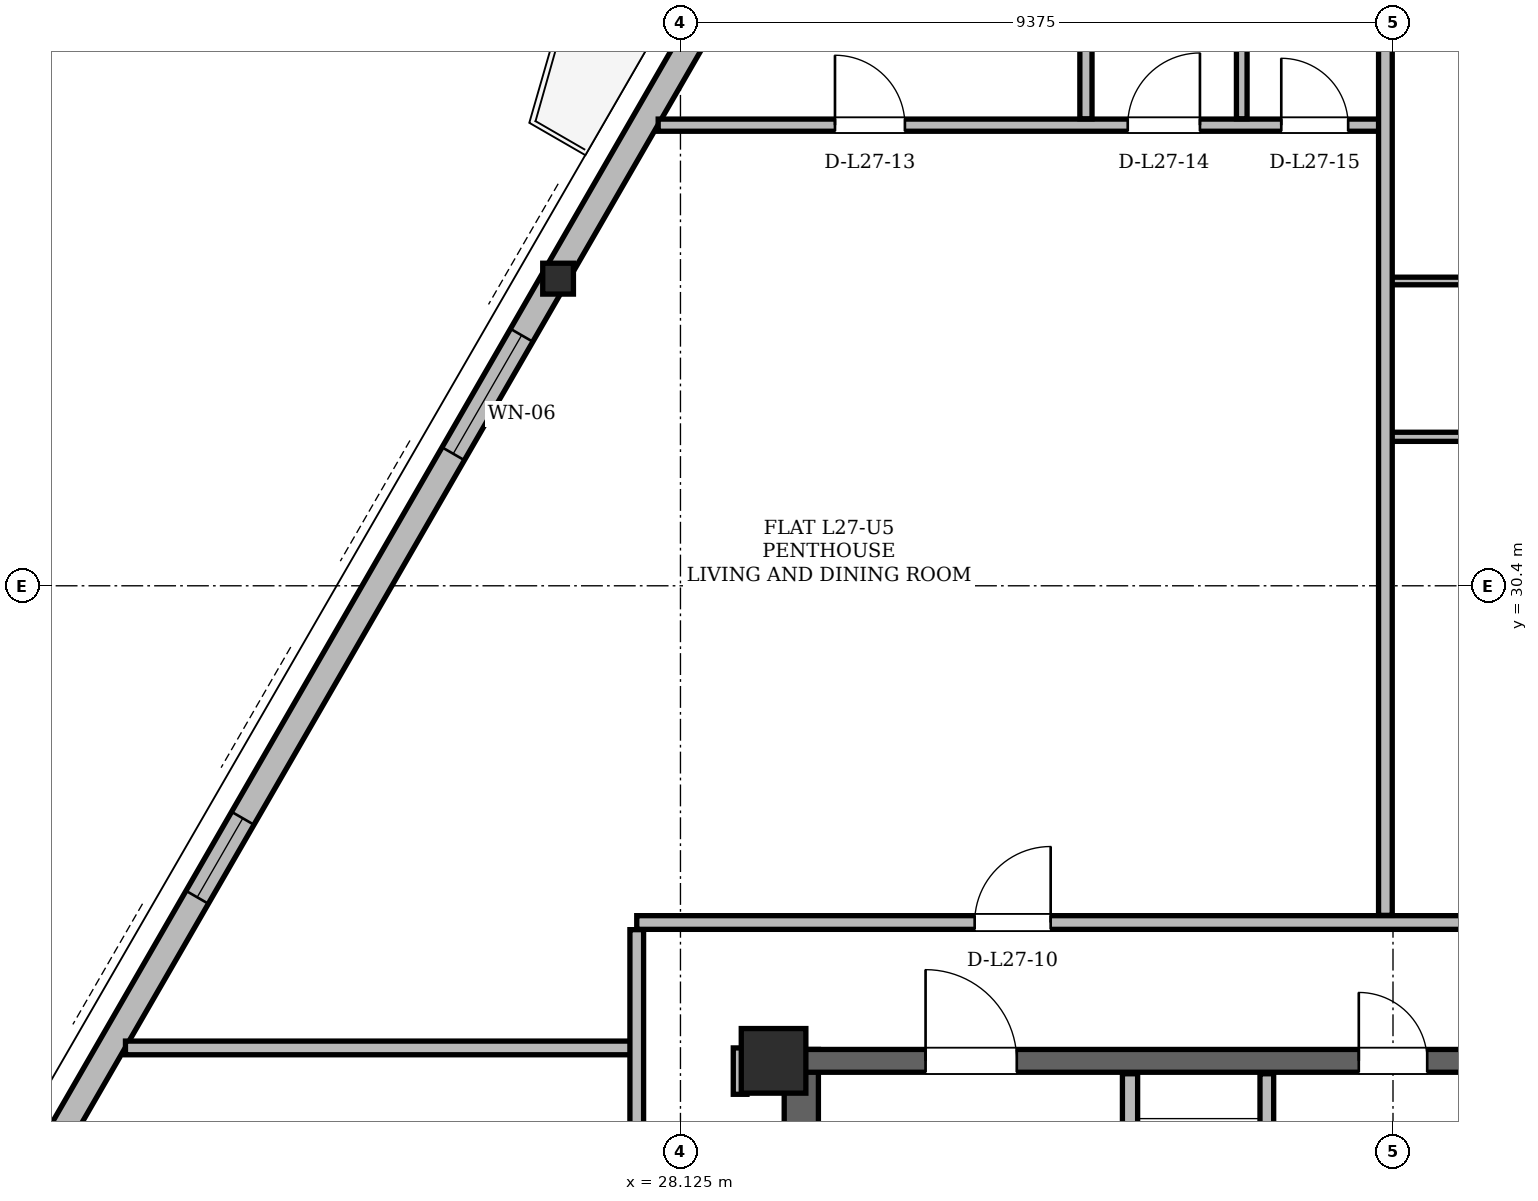
"""IFC4 building model, lengths in metres.
Left out: names, types, materials, properties, quantities, classifications, styles, units other than length and angle.
Written with IfcOpenShell. Run it as: python <this file> out.ifc"""

import sys

from ifc_helpers import new_model, si_unit, direction, frame, frame_2d, origin, origin_2d, place, context, subcontext, project, spatial, rectangle, hollow_rectangle, i_section, extrude, element, fill, save


model = new_model("IFC4")
c1 = context("Model", 3, precision=1e-05, world=origin(), true_north=direction((0.0, 1.0)))
c2 = subcontext(c1, "Body", "Model", "MODEL_VIEW")
j1 = project(units=[si_unit("LENGTHUNIT", "METRE"), si_unit("PLANEANGLEUNIT", "RADIAN")], contexts=[c1])
p1 = place(None, origin())
s1 = spatial("IfcSite", under=j1, at=p1, CompositionType="ELEMENT")
p2 = place(p1, origin())
s2 = spatial("IfcBuilding", under=s1, at=p2, CompositionType="ELEMENT")
p3 = place(p2, frame((0.0, 0.0, 104.1)))
s3 = spatial("IfcBuildingStorey", under=s2, at=p3, CompositionType="ELEMENT", Elevation=104.1)
p4 = place(p3, frame((29.35, 24.15, 0.0), z_axis=(0.0, 0.0, 1.0), x_axis=(1.0, 0.0, 0.0)))
e1 = element("IfcColumn", 1, at=p4, inside=s3, PredefinedType="COLUMN", context=c2, shape_type="SweptSolid", body=[
    extrude(hollow_rectangle(XDim=0.85, YDim=0.85, WallThickness=0.07, at=origin_2d()), origin(), (0.0, 0.0, 1.0), 3.6),
])
p5 = place(p3, frame((26.474, 34.455, 0.004), z_axis=(0.022904357376, -0.008223819711, 0.999703835745), x_axis=(0.337928188485, 0.941171896854, 0.0)))
e2 = element("IfcColumn", 2, at=p5, inside=s3, PredefinedType="COLUMN", context=c2, shape_type="SweptSolid", body=[
    extrude(i_section(OverallWidth=0.404, OverallDepth=0.406, WebThickness=0.027, FlangeThickness=0.044, at=origin_2d()), origin(), (0.0, 0.0, 1.0), 3.592),
])
p6 = place(p3, frame((29.715, 11.0, 0.0), z_axis=(0.0, 0.0, 1.0), x_axis=(0.0, 1.0, 0.0)))
e3 = element("IfcWall", 3, at=p6, inside=s3, PredefinedType="SHEAR", context=c2, shape_type="SweptSolid", body=[
    extrude(rectangle(XDim=13.3, YDim=0.45, at=frame_2d((6.65, 0.0))), origin(), (0.0, 0.0, 1.0), 3.36),
])
p7 = place(p3, frame((29.65, 24.15, 0.0), z_axis=(0.0, 0.0, 1.0), x_axis=(1.0, 0.0, 0.0)))
e4 = element("IfcWall", 4, at=p7, inside=s3, PredefinedType="SHEAR", context=c2, shape_type="SweptSolid", body=[
    extrude(rectangle(XDim=15.7, YDim=0.3, at=frame_2d((7.85, 0.0))), origin(), (0.0, 0.0, 1.0), 3.36),
])
p8 = place(p7, frame((1.7, 0.0, 0.0)))
e5 = element("IfcOpeningElement", 5, at=p8, cuts=e4, PredefinedType="OPENING", context=c2, shape_type="SweptSolid", body=[
    extrude(rectangle(XDim=1.2, YDim=2.2, at=frame_2d((0.6, 1.1))), frame((0.0, 0.15, 0.0), z_axis=(0.0, -1.0, 0.0), x_axis=(1.0, 0.0, 0.0)), (0.0, 0.0, 1.0), 0.3),
])
p9 = place(p7, frame((12.8, 0.0, 0.0)))
e6 = element("IfcOpeningElement", 6, at=p9, cuts=e4, PredefinedType="OPENING", context=c2, shape_type="SweptSolid", body=[
    extrude(rectangle(XDim=1.2, YDim=2.2, at=frame_2d((0.6, 1.1))), frame((0.0, 0.15, 0.0), z_axis=(0.0, -1.0, 0.0), x_axis=(1.0, 0.0, 0.0)), (0.0, 0.0, 1.0), 0.3),
])
p10 = place(p7, frame((7.4, 0.0, 0.0)))
e7 = element("IfcOpeningElement", 7, at=p10, cuts=e4, PredefinedType="OPENING", context=c2, shape_type="SweptSolid", body=[
    extrude(rectangle(XDim=0.9, YDim=2.05, at=frame_2d((0.45, 1.025))), frame((0.0, 0.15, 0.0), z_axis=(0.0, -1.0, 0.0), x_axis=(1.0, 0.0, 0.0)), (0.0, 0.0, 1.0), 0.3),
])
p11 = place(p3, frame((31.663, 43.444, 0.0), z_axis=(0.0, 0.0, 1.0), x_axis=(-0.499998569178, -0.866026229868, 0.0)))
e8 = element("IfcWall", 8, at=p11, inside=s3, PredefinedType="SOLIDWALL", context=c2, shape_type="SweptSolid", body=[
    extrude(rectangle(XDim=34.595, YDim=0.34, at=frame_2d((17.298, 0.0))), origin(), (0.0, 0.0, 1.0), 2.578),
])
p12 = place(p11, frame((3.219, 0.0, 0.0)))
e9 = element("IfcOpeningElement", 9, at=p12, cuts=e8, PredefinedType="OPENING", context=c2, shape_type="SweptSolid", body=[
    extrude(rectangle(XDim=1.5, YDim=2.2, at=frame_2d((0.75, 1.1))), frame((0.0, 0.17, 0.0), z_axis=(0.0, -1.0, 0.0), x_axis=(1.0, 0.0, 0.0)), (0.0, 0.0, 1.0), 0.34),
])
p13 = place(p11, frame((25.061, 0.0, 0.0)))
e10 = element("IfcOpeningElement", 10, at=p13, cuts=e8, PredefinedType="OPENING", context=c2, shape_type="SweptSolid", body=[
    extrude(rectangle(XDim=1.5, YDim=2.2, at=frame_2d((0.75, 1.1))), frame((0.0, 0.17, 0.0), z_axis=(0.0, -1.0, 0.0), x_axis=(1.0, 0.0, 0.0)), (0.0, 0.0, 1.0), 0.34),
])
p14 = place(p11, frame((31.728, 0.0, 0.85)))
e11 = element("IfcOpeningElement", 11, at=p14, cuts=e8, PredefinedType="OPENING", context=c2, shape_type="SweptSolid", body=[
    extrude(rectangle(XDim=1.6, YDim=1.618, at=frame_2d((0.8, 0.809))), frame((0.0, 0.17, 0.0), z_axis=(0.0, -1.0, 0.0), x_axis=(1.0, 0.0, 0.0)), (0.0, 0.0, 1.0), 0.34),
])
p15 = place(p11, frame((26.86, 0.0, 0.85)))
e12 = element("IfcOpeningElement", 12, at=p15, cuts=e8, PredefinedType="OPENING", context=c2, shape_type="SweptSolid", body=[
    extrude(rectangle(XDim=1.2, YDim=1.48, at=frame_2d((0.6, 0.74))), frame((0.0, 0.17, 0.0), z_axis=(0.0, -1.0, 0.0), x_axis=(1.0, 0.0, 0.0)), (0.0, 0.0, 1.0), 0.34),
])
p16 = place(p11, frame((11.256, 0.0, 0.85)))
e13 = element("IfcOpeningElement", 13, at=p16, cuts=e8, PredefinedType="OPENING", context=c2, shape_type="SweptSolid", body=[
    extrude(rectangle(XDim=1.8, YDim=1.618, at=frame_2d((0.9, 0.809))), frame((0.0, 0.17, 0.0), z_axis=(0.0, -1.0, 0.0), x_axis=(1.0, 0.0, 0.0)), (0.0, 0.0, 1.0), 0.34),
])
p17 = place(p11, frame((18.593, 0.0, 0.85)))
e14 = element("IfcOpeningElement", 14, at=p17, cuts=e8, PredefinedType="OPENING", context=c2, shape_type="SweptSolid", body=[
    extrude(rectangle(XDim=1.2, YDim=1.48, at=frame_2d((0.6, 0.74))), frame((0.0, 0.17, 0.0), z_axis=(0.0, -1.0, 0.0), x_axis=(1.0, 0.0, 0.0)), (0.0, 0.0, 1.0), 0.34),
])
p18 = place(p11, frame((1.106, 0.0, 0.85)))
e15 = element("IfcOpeningElement", 15, at=p18, cuts=e8, PredefinedType="OPENING", context=c2, shape_type="SweptSolid", body=[
    extrude(rectangle(XDim=1.6, YDim=1.618, at=frame_2d((0.8, 0.809))), frame((0.0, 0.17, 0.0), z_axis=(0.0, -1.0, 0.0), x_axis=(1.0, 0.0, 0.0)), (0.0, 0.0, 1.0), 0.34),
])
p19 = place(p3, frame((34.04, 19.48, 0.0), z_axis=(0.0, 0.0, 1.0), x_axis=(0.0, 1.0, 0.0)))
e16 = element("IfcWall", 16, at=p19, inside=s3, PredefinedType="PARTITIONING", context=c2, shape_type="SweptSolid", body=[
    extrude(rectangle(XDim=4.5, YDim=0.2, at=frame_2d((2.25, 0.0))), origin(), (0.0, 0.0, 1.0), 2.4),
])
p20 = place(p19, frame((2.12, 0.0, 0.0)))
e17 = element("IfcOpeningElement", 17, at=p20, cuts=e16, PredefinedType="OPENING", context=c2, shape_type="SweptSolid", body=[
    extrude(rectangle(XDim=1.1, YDim=2.2, at=frame_2d((0.55, 1.1))), frame((0.0, 0.1, 0.0), z_axis=(0.0, -1.0, 0.0), x_axis=(1.0, 0.0, 0.0)), (0.0, 0.0, 1.0), 0.2),
])
p21 = place(p3, frame((35.84, 20.96, 0.0), z_axis=(0.0, 0.0, 1.0), x_axis=(0.0, 1.0, 0.0)))
e18 = element("IfcWall", 18, at=p21, inside=s3, PredefinedType="PARTITIONING", context=c2, shape_type="SweptSolid", body=[
    extrude(rectangle(XDim=3.02, YDim=0.18, at=frame_2d((1.51, 0.0))), origin(), (0.0, 0.0, 1.0), 2.4),
])
p22 = place(p3, frame((20.823, 24.32, 0.0), z_axis=(0.0, 0.0, 1.0), x_axis=(1.0, 0.0, 0.0)))
e19 = element("IfcWall", 19, at=p22, inside=s3, PredefinedType="PARTITIONING", context=c2, shape_type="SweptSolid", body=[
    extrude(rectangle(XDim=6.787, YDim=0.18, at=frame_2d((3.394, 0.0))), origin(), (0.0, 0.0, 1.0), 3.36),
])
p23 = place(p3, frame((27.55, 25.97, 0.0), z_axis=(0.0, 0.0, 1.0), x_axis=(1.0, 0.0, 0.0)))
e20 = element("IfcWall", 20, at=p23, inside=s3, PredefinedType="PARTITIONING", context=c2, shape_type="SweptSolid", body=[
    extrude(rectangle(XDim=19.9, YDim=0.18, at=frame_2d((9.95, 0.0))), origin(), (0.0, 0.0, 1.0), 2.814),
])
p24 = place(p23, frame((4.446, 0.0, 0.0)))
e21 = element("IfcOpeningElement", 21, at=p24, cuts=e20, PredefinedType="OPENING", context=c2, shape_type="SweptSolid", body=[
    extrude(rectangle(XDim=1.0, YDim=2.18, at=frame_2d((0.5, 1.09))), frame((0.0, 0.09, 0.0), z_axis=(0.0, -1.0, 0.0), x_axis=(1.0, 0.0, 0.0)), (0.0, 0.0, 1.0), 0.18),
])
p25 = place(p23, frame((13.4, 0.0, 0.0)))
e22 = element("IfcOpeningElement", 22, at=p25, cuts=e20, PredefinedType="OPENING", context=c2, shape_type="SweptSolid", body=[
    extrude(rectangle(XDim=1.3, YDim=2.2, at=frame_2d((0.65, 1.1))), frame((0.0, 0.09, 0.0), z_axis=(0.0, -1.0, 0.0), x_axis=(1.0, 0.0, 0.0)), (0.0, 0.0, 1.0), 0.18),
])
p26 = place(p23, frame((16.99, 0.0, 0.0)))
e23 = element("IfcOpeningElement", 23, at=p26, cuts=e20, PredefinedType="OPENING", context=c2, shape_type="SweptSolid", body=[
    extrude(rectangle(XDim=1.0, YDim=2.18, at=frame_2d((0.5, 1.09))), frame((0.0, 0.09, 0.0), z_axis=(0.0, -1.0, 0.0), x_axis=(1.0, 0.0, 0.0)), (0.0, 0.0, 1.0), 0.18),
])
p27 = place(p3, frame((37.35, 32.36, 0.0), z_axis=(0.0, 0.0, 1.0), x_axis=(1.0, 0.0, 0.0)))
e24 = element("IfcWall", 24, at=p27, inside=s3, PredefinedType="PARTITIONING", context=c2, shape_type="SweptSolid", body=[
    extrude(rectangle(XDim=4.4, YDim=0.12, at=frame_2d((2.2, 0.0))), origin(), (0.0, 0.0, 1.0), 3.36),
])
p28 = place(p3, frame((37.35, 34.41, 0.0), z_axis=(0.0, 0.0, 1.0), x_axis=(1.0, 0.0, 0.0)))
e25 = element("IfcWall", 25, at=p28, inside=s3, PredefinedType="PARTITIONING", context=c2, shape_type="SweptSolid", body=[
    extrude(rectangle(XDim=4.4, YDim=0.1, at=frame_2d((2.2, 0.0))), origin(), (0.0, 0.0, 1.0), 3.36),
])
p29 = place(p3, frame((27.832, 36.46, 0.0), z_axis=(0.0, 0.0, 1.0), x_axis=(1.0, 0.0, 0.0)))
e26 = element("IfcWall", 26, at=p29, inside=s3, PredefinedType="PARTITIONING", context=c2, shape_type="SweptSolid", body=[
    extrude(rectangle(XDim=9.618, YDim=0.16, at=frame_2d((4.809, 0.0))), origin(), (0.0, 0.0, 1.0), 2.814),
])
p30 = place(p29, frame((2.326, 0.0, 0.0)))
e27 = element("IfcOpeningElement", 27, at=p30, cuts=e26, PredefinedType="OPENING", context=c2, shape_type="SweptSolid", body=[
    extrude(rectangle(XDim=0.92, YDim=2.12, at=frame_2d((0.46, 1.06))), frame((0.0, 0.08, 0.0), z_axis=(0.0, -1.0, 0.0), x_axis=(1.0, 0.0, 0.0)), (0.0, 0.0, 1.0), 0.16),
])
p31 = place(p29, frame((6.178, 0.0, 0.0)))
e28 = element("IfcOpeningElement", 28, at=p31, cuts=e26, PredefinedType="OPENING", context=c2, shape_type="SweptSolid", body=[
    extrude(rectangle(XDim=0.95, YDim=2.1, at=frame_2d((0.475, 1.05))), frame((0.0, 0.08, 0.0), z_axis=(0.0, -1.0, 0.0), x_axis=(1.0, 0.0, 0.0)), (0.0, 0.0, 1.0), 0.16),
])
p32 = place(p29, frame((8.198, 0.0, 0.0)))
e29 = element("IfcOpeningElement", 29, at=p32, cuts=e26, PredefinedType="OPENING", context=c2, shape_type="SweptSolid", body=[
    extrude(rectangle(XDim=0.88, YDim=2.08, at=frame_2d((0.44, 1.04))), frame((0.0, 0.08, 0.0), z_axis=(0.0, -1.0, 0.0), x_axis=(1.0, 0.0, 0.0)), (0.0, 0.0, 1.0), 0.16),
])
p33 = place(p3, frame((27.55, 11.044, 0.0), z_axis=(0.0, 0.0, 1.0), x_axis=(0.0, 1.0, 0.0)))
e30 = element("IfcWall", 30, at=p33, inside=s3, PredefinedType="PARTITIONING", context=c2, shape_type="SweptSolid", body=[
    extrude(rectangle(XDim=14.832, YDim=0.18, at=frame_2d((7.416, 0.0))), origin(), (0.0, 0.0, 1.0), 2.814),
])
p34 = place(p33, frame((9.795, 0.0, 0.0)))
e31 = element("IfcOpeningElement", 31, at=p34, cuts=e30, PredefinedType="OPENING", context=c2, shape_type="SweptSolid", body=[
    extrude(rectangle(XDim=1.0, YDim=2.18, at=frame_2d((0.5, 1.09))), frame((0.0, 0.09, 0.0), z_axis=(0.0, -1.0, 0.0), x_axis=(1.0, 0.0, 0.0)), (0.0, 0.0, 1.0), 0.18),
])
p35 = place(p3, frame((28.91, 23.71, 0.0), z_axis=(0.0, 0.0, 1.0), x_axis=(0.0, 1.0, 0.0)))
e32 = element("IfcWall", 32, at=p35, inside=s3, PredefinedType="PARTITIONING", context=c2, shape_type="SweptSolid", body=[
    extrude(rectangle(XDim=0.61, YDim=0.18, at=frame_2d((0.305, 0.0))), origin(), (0.0, 0.0, 1.0), 3.36),
])
p36 = place(p3, frame((33.46, 36.544, 0.0), z_axis=(0.0, 0.0, 1.0), x_axis=(0.0, 1.0, 0.0)))
e33 = element("IfcWall", 33, at=p36, inside=s3, PredefinedType="PARTITIONING", context=c2, shape_type="SweptSolid", body=[
    extrude(rectangle(XDim=6.726, YDim=0.16, at=frame_2d((3.363, 0.0))), origin(), (0.0, 0.0, 1.0), 3.36),
])
p37 = place(p3, frame((35.51, 36.544, 0.0), z_axis=(0.0, 0.0, 1.0), x_axis=(0.0, 1.0, 0.0)))
e34 = element("IfcWall", 34, at=p37, inside=s3, PredefinedType="PARTITIONING", context=c2, shape_type="SweptSolid", body=[
    extrude(rectangle(XDim=6.726, YDim=0.14, at=frame_2d((3.363, 0.0))), origin(), (0.0, 0.0, 1.0), 3.36),
])
p38 = place(p3, frame((37.4, 26.064, 0.0), z_axis=(0.0, 0.0, 1.0), x_axis=(0.0, 1.0, 0.0)))
e35 = element("IfcWall", 35, at=p38, inside=s3, PredefinedType="PARTITIONING", context=c2, shape_type="SweptSolid", body=[
    extrude(rectangle(XDim=17.206, YDim=0.18, at=frame_2d((8.603, 0.0))), origin(), (0.0, 0.0, 1.0), 3.36),
])
p39 = place(p16, origin())
e36 = element("IfcWindow", 36, at=p39, inside=s3, PartitioningType="SINGLE_PANEL", PredefinedType="WINDOW", context=c2, shape_type="SweptSolid", body=[
    extrude(rectangle(XDim=1.8, YDim=1.618, at=frame_2d((0.9, 0.809))), frame((0.0, 0.03, 0.0), z_axis=(0.0, -1.0, 0.0), x_axis=(1.0, 0.0, 0.0)), (0.0, 0.0, 1.0), 0.06),
])
fill(e13, e36)
p40 = place(p17, origin())
e37 = element("IfcWindow", 37, at=p40, inside=s3, PartitioningType="SINGLE_PANEL", PredefinedType="WINDOW", context=c2, shape_type="SweptSolid", body=[
    extrude(rectangle(XDim=1.2, YDim=1.48, at=frame_2d((0.6, 0.74))), frame((0.0, 0.03, 0.0), z_axis=(0.0, -1.0, 0.0), x_axis=(1.0, 0.0, 0.0)), (0.0, 0.0, 1.0), 0.06),
])
fill(e14, e37)
p41 = place(p8, origin())
e38 = element("IfcDoor", 38, at=p41, inside=s3, OperationType="SINGLE_SWING_LEFT", PredefinedType="DOOR", context=c2, shape_type="SweptSolid", body=[
    extrude(rectangle(XDim=1.2, YDim=2.2, at=frame_2d((0.6, 1.1))), frame((0.0, 0.025, 0.0), z_axis=(0.0, -1.0, 0.0), x_axis=(1.0, 0.0, 0.0)), (0.0, 0.0, 1.0), 0.05),
])
fill(e5, e38)
p42 = place(p10, origin())
e39 = element("IfcDoor", 39, at=p42, inside=s3, OperationType="SINGLE_SWING_LEFT", PredefinedType="DOOR", context=c2, shape_type="SweptSolid", body=[
    extrude(rectangle(XDim=0.9, YDim=2.05, at=frame_2d((0.45, 1.025))), frame((0.0, 0.025, 0.0), z_axis=(0.0, -1.0, 0.0), x_axis=(1.0, 0.0, 0.0)), (0.0, 0.0, 1.0), 0.05),
])
fill(e7, e39)
p43 = place(p24, origin())
e40 = element("IfcDoor", 40, at=p43, inside=s3, OperationType="SINGLE_SWING_RIGHT", PredefinedType="DOOR", context=c2, shape_type="SweptSolid", body=[
    extrude(rectangle(XDim=1.0, YDim=2.18, at=frame_2d((0.5, 1.09))), frame((0.0, 0.025, 0.0), z_axis=(0.0, -1.0, 0.0), x_axis=(1.0, 0.0, 0.0)), (0.0, 0.0, 1.0), 0.05),
])
fill(e21, e40)
p44 = place(p30, origin())
e41 = element("IfcDoor", 41, at=p44, inside=s3, OperationType="SINGLE_SWING_LEFT", PredefinedType="DOOR", context=c2, shape_type="SweptSolid", body=[
    extrude(rectangle(XDim=0.92, YDim=2.12, at=frame_2d((0.46, 1.06))), frame((0.0, 0.025, 0.0), z_axis=(0.0, -1.0, 0.0), x_axis=(1.0, 0.0, 0.0)), (0.0, 0.0, 1.0), 0.05),
])
fill(e27, e41)
p45 = place(p31, origin())
e42 = element("IfcDoor", 42, at=p45, inside=s3, OperationType="SINGLE_SWING_RIGHT", PredefinedType="DOOR", context=c2, shape_type="SweptSolid", body=[
    extrude(rectangle(XDim=0.95, YDim=2.1, at=frame_2d((0.475, 1.05))), frame((0.0, 0.025, 0.0), z_axis=(0.0, -1.0, 0.0), x_axis=(1.0, 0.0, 0.0)), (0.0, 0.0, 1.0), 0.05),
])
fill(e28, e42)
p46 = place(p32, origin())
e43 = element("IfcDoor", 43, at=p46, inside=s3, OperationType="SINGLE_SWING_LEFT", PredefinedType="DOOR", context=c2, shape_type="SweptSolid", body=[
    extrude(rectangle(XDim=0.88, YDim=2.08, at=frame_2d((0.44, 1.04))), frame((0.0, 0.025, 0.0), z_axis=(0.0, -1.0, 0.0), x_axis=(1.0, 0.0, 0.0)), (0.0, 0.0, 1.0), 0.05),
])
fill(e29, e43)
save(model, sys.argv[1])
